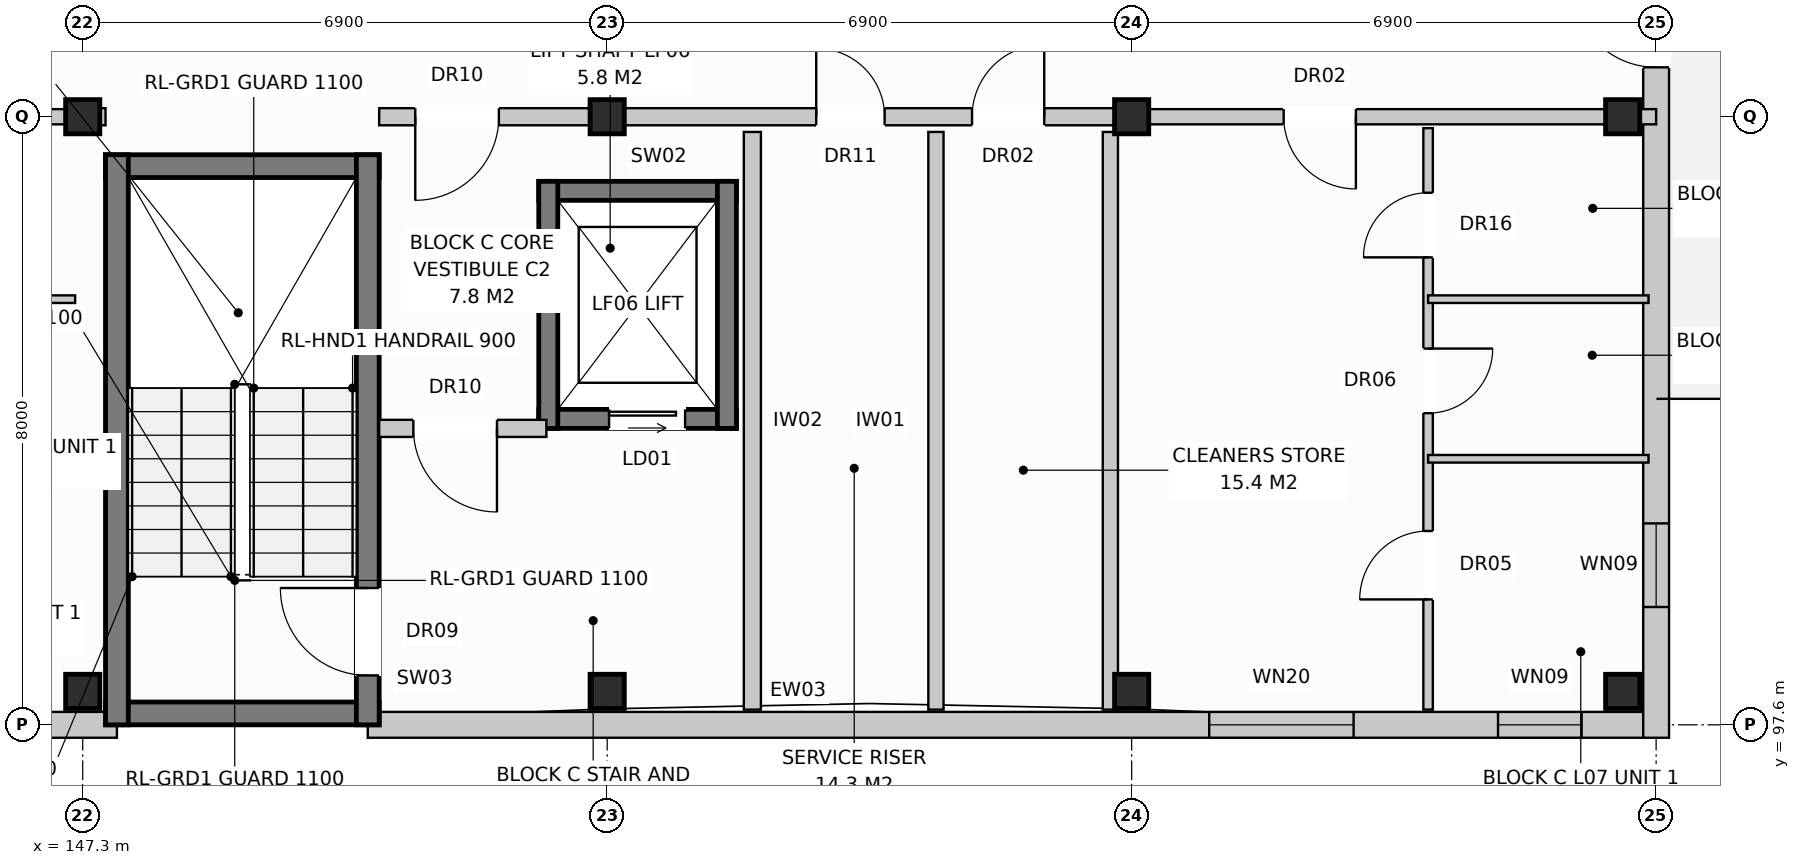
"""IFC4 building model, lengths in metres.
Left out: names, types, materials, properties, quantities, classifications, styles, units other than length and angle.
Written with IfcOpenShell. Run it as: python <this file> out.ifc"""

import sys

from ifc_helpers import new_model, si_unit, direction, frame, frame_2d, origin, origin_with_axes, origin_2d, place, context, subcontext, project, spatial, rectangle, extrude, element, fill, save


model = new_model("IFC4")
c1 = context("Model", 3, precision=1e-05, world=origin(), true_north=direction((0.0, 1.0)))
c2 = subcontext(c1, "Body", "Model", "MODEL_VIEW")
j1 = project(units=[si_unit("LENGTHUNIT", "METRE"), si_unit("PLANEANGLEUNIT", "RADIAN")], contexts=[c1])
p1 = place(None, origin())
s1 = spatial("IfcSite", under=j1, at=p1, CompositionType="ELEMENT")
p2 = place(p1, origin())
s2 = spatial("IfcBuilding", under=s1, at=p2, CompositionType="ELEMENT")
p3 = place(p2, frame((0.0, 0.0, 24.0)))
s3 = spatial("IfcBuildingStorey", under=s2, at=p3, CompositionType="ELEMENT", Elevation=24.0)
for number, where, z_axis, x_axis in (
    (1, (147.3, 98.04, 0.0), (0.0, 0.0, 1.0), (1.0, 0.0, 0.0)),
    (2, (147.3, 105.6, 0.0), (0.0, 0.0, 1.0), (1.0, 0.0, 0.0)),
    (3, (154.2, 98.04, 0.0), (0.0, 0.0, 1.0), (1.0, 0.0, 0.0)),
    (4, (154.2, 105.6, 0.0), (0.0, 0.0, 1.0), (1.0, 0.0, 0.0)),
    (5, (161.1, 98.04, 0.0), (0.0, 0.0, 1.0), (1.0, 0.0, 0.0)),
    (6, (161.1, 105.6, 0.0), (0.0, 0.0, 1.0), (1.0, 0.0, 0.0)),
    (7, (167.56, 98.04, 0.0), (0.0, 0.0, 1.0), (1.0, 0.0, 0.0)),
    (8, (167.56, 105.6, 0.0), (0.0, 0.0, 1.0), (1.0, 0.0, 0.0)),
):
    element("IfcColumn", number, at=place(p3, frame(where, z_axis=z_axis, x_axis=x_axis)), inside=s3, PredefinedType="COLUMN", context=c2, shape_type="SweptSolid", body=[
        extrude(rectangle(XDim=0.45, YDim=0.45, at=origin_2d()), origin(), (0.0, 0.0, 1.0), 3.2),
    ])
p4 = place(p3, frame((130.35, 97.6, 0.0), z_axis=(0.0, 0.0, 1.0), x_axis=(1.0, 0.0, 0.0)))
e9 = element("IfcWall", 9, at=p4, inside=s3, PredefinedType="STANDARD", context=c2, shape_type="SweptSolid", body=[
    extrude(rectangle(XDim=17.4, YDim=0.34, at=frame_2d((8.7, 0.0))), origin(), (0.0, 0.0, 1.0), 2.95),
])
p5 = place(p4, frame((11.87, 0.0, 0.0)))
e10 = element("IfcOpeningElement", 10, at=p5, cuts=e9, PredefinedType="OPENING", context=c2, shape_type="SweptSolid", body=[
    extrude(rectangle(XDim=0.95, YDim=2.1, at=frame_2d((0.475, 1.05))), frame((0.0, 0.182, 0.0), z_axis=(0.0, -1.0, 0.0), x_axis=(1.0, 0.0, 0.0)), (0.0, 0.0, 1.0), 0.364),
])
p6 = place(p4, frame((14.87, 0.0, 0.72)))
e11 = element("IfcOpeningElement", 11, at=p6, cuts=e9, PredefinedType="OPENING", context=c2, shape_type="SweptSolid", body=[
    extrude(rectangle(XDim=1.1, YDim=1.5, at=frame_2d((0.55, 0.75))), frame((0.0, 0.182, 0.0), z_axis=(0.0, -1.0, 0.0), x_axis=(1.0, 0.0, 0.0)), (0.0, 0.0, 1.0), 0.364),
])
p7 = place(p3, frame((151.05, 97.6, 0.0), z_axis=(0.0, 0.0, 1.0), x_axis=(1.0, 0.0, 0.0)))
e12 = element("IfcWall", 12, at=p7, inside=s3, PredefinedType="STANDARD", context=c2, shape_type="SweptSolid", body=[
    extrude(rectangle(XDim=16.79, YDim=0.34, at=frame_2d((8.395, 0.0))), origin(), (0.0, 0.0, 1.0), 2.95),
])
p8 = place(p7, frame((11.07, 0.0, 0.8)))
e13 = element("IfcOpeningElement", 13, at=p8, cuts=e12, PredefinedType="OPENING", context=c2, shape_type="SweptSolid", body=[
    extrude(rectangle(XDim=1.9, YDim=1.85, at=frame_2d((0.95, 0.925))), frame((0.0, 0.182, 0.0), z_axis=(0.0, -1.0, 0.0), x_axis=(1.0, 0.0, 0.0)), (0.0, 0.0, 1.0), 0.364),
])
p9 = place(p7, frame((14.87, 0.0, 0.72)))
e14 = element("IfcOpeningElement", 14, at=p9, cuts=e12, PredefinedType="OPENING", context=c2, shape_type="SweptSolid", body=[
    extrude(rectangle(XDim=1.1, YDim=1.5, at=frame_2d((0.55, 0.75))), frame((0.0, 0.182, 0.0), z_axis=(0.0, -1.0, 0.0), x_axis=(1.0, 0.0, 0.0)), (0.0, 0.0, 1.0), 0.364),
])
p10 = place(p3, frame((168.0, 97.43, 0.0), z_axis=(0.0, 0.0, 1.0), x_axis=(0.0, 1.0, 0.0)))
e15 = element("IfcWall", 15, at=p10, inside=s3, PredefinedType="STANDARD", context=c2, shape_type="SweptSolid", body=[
    extrude(rectangle(XDim=18.74, YDim=0.34, at=frame_2d((9.37, 0.0))), origin(), (0.0, 0.0, 1.0), 2.95),
])
p11 = place(p10, frame((8.82, 0.0, 0.0)))
e16 = element("IfcOpeningElement", 16, at=p11, cuts=e15, PredefinedType="OPENING", context=c2, shape_type="SweptSolid", body=[
    extrude(rectangle(XDim=1.1, YDim=2.1, at=frame_2d((0.55, 1.05))), frame((0.0, 0.182, 0.0), z_axis=(0.0, -1.0, 0.0), x_axis=(1.0, 0.0, 0.0)), (0.0, 0.0, 1.0), 0.364),
])
p12 = place(p10, frame((1.72, 0.0, 0.72)))
e17 = element("IfcOpeningElement", 17, at=p12, cuts=e15, PredefinedType="OPENING", context=c2, shape_type="SweptSolid", body=[
    extrude(rectangle(XDim=1.1, YDim=1.5, at=frame_2d((0.55, 0.75))), frame((0.0, 0.182, 0.0), z_axis=(0.0, -1.0, 0.0), x_axis=(1.0, 0.0, 0.0)), (0.0, 0.0, 1.0), 0.364),
])
p13 = place(p10, frame((15.92, 0.0, 0.72)))
e18 = element("IfcOpeningElement", 18, at=p13, cuts=e15, PredefinedType="OPENING", context=c2, shape_type="SweptSolid", body=[
    extrude(rectangle(XDim=1.1, YDim=1.5, at=frame_2d((0.55, 0.75))), frame((0.0, 0.182, 0.0), z_axis=(0.0, -1.0, 0.0), x_axis=(1.0, 0.0, 0.0)), (0.0, 0.0, 1.0), 0.364),
])
for number, where, z_axis, x_axis in (
    (19, (147.6, 97.75, 0.0), (0.0, 0.0, 1.0), (1.0, 0.0, 0.0)),
    (20, (147.6, 104.95, 0.0), (0.0, 0.0, 1.0), (1.0, 0.0, 0.0)),
):
    element("IfcWall", number, at=place(p3, frame(where, z_axis=z_axis, x_axis=x_axis)), inside=s3, PredefinedType="SHEAR", context=c2, shape_type="SweptSolid", body=[
        extrude(rectangle(XDim=3.6, YDim=0.3, at=frame_2d((1.8, 0.0))), origin(), (0.0, 0.0, 1.0), 2.95),
    ])
p14 = place(p3, frame((147.75, 97.6, 0.0), z_axis=(0.0, 0.0, 1.0), x_axis=(0.0, 1.0, 0.0)))
e21 = element("IfcWall", 21, at=p14, inside=s3, PredefinedType="SHEAR", context=c2, shape_type="SweptSolid", body=[
    extrude(rectangle(XDim=7.5, YDim=0.3, at=frame_2d((3.75, 0.0))), origin(), (0.0, 0.0, 1.0), 2.95),
])
p15 = place(p3, frame((151.05, 97.6, 0.0), z_axis=(0.0, 0.0, 1.0), x_axis=(0.0, 1.0, 0.0)))
e22 = element("IfcWall", 22, at=p15, inside=s3, PredefinedType="SHEAR", context=c2, shape_type="SweptSolid", body=[
    extrude(rectangle(XDim=7.5, YDim=0.3, at=frame_2d((3.75, 0.0))), origin(), (0.0, 0.0, 1.0), 2.95),
])
p16 = place(p15, frame((0.65, 0.0, 0.0)))
e23 = element("IfcOpeningElement", 23, at=p16, cuts=e22, PredefinedType="OPENING", context=c2, shape_type="SweptSolid", body=[
    extrude(rectangle(XDim=1.15, YDim=2.15, at=frame_2d((0.575, 1.075))), frame((0.0, 0.162, 0.0), z_axis=(0.0, -1.0, 0.0), x_axis=(1.0, 0.0, 0.0)), (0.0, 0.0, 1.0), 0.324),
])
p17 = place(p3, frame((153.3, 101.625, 0.0), z_axis=(0.0, 0.0, 1.0), x_axis=(1.0, 0.0, 0.0)))
e24 = element("IfcWall", 24, at=p17, inside=s3, PredefinedType="SHEAR", context=c2, shape_type="SweptSolid", body=[
    extrude(rectangle(XDim=2.6, YDim=0.25, at=frame_2d((1.3, 0.0))), origin(), (0.0, 0.0, 1.0), 2.95),
])
p18 = place(p17, frame((0.925, 0.0, 0.0)))
e25 = element("IfcOpeningElement", 25, at=p18, cuts=e24, PredefinedType="OPENING", context=c2, shape_type="SweptSolid", body=[
    extrude(rectangle(XDim=1.0, YDim=2.1, at=frame_2d((0.5, 1.05))), frame((0.0, 0.137, 0.0), z_axis=(0.0, -1.0, 0.0), x_axis=(1.0, 0.0, 0.0)), (0.0, 0.0, 1.0), 0.274),
])
p19 = place(p3, frame((153.3, 104.625, 0.0), z_axis=(0.0, 0.0, 1.0), x_axis=(1.0, 0.0, 0.0)))
e26 = element("IfcWall", 26, at=p19, inside=s3, PredefinedType="SHEAR", context=c2, shape_type="SweptSolid", body=[
    extrude(rectangle(XDim=2.6, YDim=0.25, at=frame_2d((1.3, 0.0))), origin(), (0.0, 0.0, 1.0), 2.95),
])
for number, where, z_axis, x_axis in (
    (27, (153.425, 101.5, 0.0), (0.0, 0.0, 1.0), (0.0, 1.0, 0.0)),
    (28, (155.775, 101.5, 0.0), (0.0, 0.0, 1.0), (0.0, 1.0, 0.0)),
):
    element("IfcWall", number, at=place(p3, frame(where, z_axis=z_axis, x_axis=x_axis)), inside=s3, PredefinedType="SHEAR", context=c2, shape_type="SweptSolid", body=[
        extrude(rectangle(XDim=3.25, YDim=0.25, at=frame_2d((1.625, 0.0))), origin(), (0.0, 0.0, 1.0), 2.95),
    ])
p20 = place(p3, frame((156.11, 97.8, 0.0), z_axis=(0.0, 0.0, 1.0), x_axis=(0.0, 1.0, 0.0)))
e29 = element("IfcWall", 29, at=p20, inside=s3, PredefinedType="PARTITIONING", context=c2, shape_type="SweptSolid", body=[
    extrude(rectangle(XDim=7.6, YDim=0.225, at=frame_2d((3.8, 0.0))), origin(), (0.0, 0.0, 1.0), 2.95),
])
p21 = place(p3, frame((151.2, 101.5, 0.0), z_axis=(0.0, 0.0, 1.0), x_axis=(1.0, 0.0, 0.0)))
e30 = element("IfcWall", 30, at=p21, inside=s3, PredefinedType="PARTITIONING", context=c2, shape_type="SweptSolid", body=[
    extrude(rectangle(XDim=2.2, YDim=0.225, at=frame_2d((1.1, 0.0))), origin(), (0.0, 0.0, 1.0), 2.95),
])
p22 = place(p21, frame((0.45, 0.0, 0.0)))
e31 = element("IfcOpeningElement", 31, at=p22, cuts=e30, PredefinedType="OPENING", context=c2, shape_type="SweptSolid", body=[
    extrude(rectangle(XDim=1.1, YDim=2.15, at=frame_2d((0.55, 1.075))), frame((0.0, 0.125, 0.0), z_axis=(0.0, -1.0, 0.0), x_axis=(1.0, 0.0, 0.0)), (0.0, 0.0, 1.0), 0.249),
])
p23 = place(p3, frame((147.3, 105.6, 0.0), z_axis=(0.0, 0.0, 1.0), x_axis=(1.0, 0.0, 0.0)))
e32 = element("IfcWall", 32, at=p23, inside=s3, PredefinedType="PARTITIONING", context=c2, shape_type="SweptSolid", body=[
    extrude(rectangle(XDim=0.3, YDim=0.225, at=frame_2d((0.15, 0.0))), origin(), (0.0, 0.0, 1.0), 2.95),
])
p24 = place(p3, frame((158.525, 97.8, 0.0), z_axis=(0.0, 0.0, 1.0), x_axis=(0.0, 1.0, 0.0)))
e33 = element("IfcWall", 33, at=p24, inside=s3, PredefinedType="PARTITIONING", context=c2, shape_type="SweptSolid", body=[
    extrude(rectangle(XDim=7.6, YDim=0.2, at=frame_2d((3.8, 0.0))), origin(), (0.0, 0.0, 1.0), 2.95),
])
p25 = place(p3, frame((160.82, 97.8, 0.0), z_axis=(0.0, 0.0, 1.0), x_axis=(0.0, 1.0, 0.0)))
e34 = element("IfcWall", 34, at=p25, inside=s3, PredefinedType="PARTITIONING", context=c2, shape_type="SweptSolid", body=[
    extrude(rectangle(XDim=7.6, YDim=0.2, at=frame_2d((3.8, 0.0))), origin(), (0.0, 0.0, 1.0), 2.39),
])
p26 = place(p3, frame((151.2, 105.6, 0.0), z_axis=(0.0, 0.0, 1.0), x_axis=(1.0, 0.0, 0.0)))
e35 = element("IfcWall", 35, at=p26, inside=s3, PredefinedType="PARTITIONING", context=c2, shape_type="SweptSolid", body=[
    extrude(rectangle(XDim=9.9, YDim=0.225, at=frame_2d((4.95, 0.0))), origin(), (0.0, 0.0, 1.0), 2.39),
])
p27 = place(p26, frame((0.475, 0.0, 0.0)))
e36 = element("IfcOpeningElement", 36, at=p27, cuts=e35, PredefinedType="OPENING", context=c2, shape_type="SweptSolid", body=[
    extrude(rectangle(XDim=1.1, YDim=2.15, at=frame_2d((0.55, 1.075))), frame((0.0, 0.125, 0.0), z_axis=(0.0, -1.0, 0.0), x_axis=(1.0, 0.0, 0.0)), (0.0, 0.0, 1.0), 0.249),
])
p28 = place(p26, frame((5.75, 0.0, 0.0)))
e37 = element("IfcOpeningElement", 37, at=p28, cuts=e35, PredefinedType="OPENING", context=c2, shape_type="SweptSolid", body=[
    extrude(rectangle(XDim=0.9, YDim=2.1, at=frame_2d((0.45, 1.05))), frame((0.0, 0.125, 0.0), z_axis=(0.0, -1.0, 0.0), x_axis=(1.0, 0.0, 0.0)), (0.0, 0.0, 1.0), 0.249),
])
p29 = place(p26, frame((7.8, 0.0, 0.0)))
e38 = element("IfcOpeningElement", 38, at=p29, cuts=e35, PredefinedType="OPENING", context=c2, shape_type="SweptSolid", body=[
    extrude(rectangle(XDim=0.95, YDim=2.15, at=frame_2d((0.475, 1.075))), frame((0.0, 0.125, 0.0), z_axis=(0.0, -1.0, 0.0), x_axis=(1.0, 0.0, 0.0)), (0.0, 0.0, 1.0), 0.249),
])
p30 = place(p3, frame((140.4, 105.6, 0.0), z_axis=(0.0, 0.0, 1.0), x_axis=(1.0, 0.0, 0.0)))
e39 = element("IfcWall", 39, at=p30, inside=s3, PredefinedType="PARTITIONING", context=c2, shape_type="SweptSolid", body=[
    extrude(rectangle(XDim=6.9, YDim=0.2, at=frame_2d((3.45, 0.0))), origin(), (0.0, 0.0, 1.0), 2.39),
])
p31 = place(p30, frame((2.0, 0.0, 0.0)))
e40 = element("IfcOpeningElement", 40, at=p31, cuts=e39, PredefinedType="OPENING", context=c2, shape_type="SweptSolid", body=[
    extrude(rectangle(XDim=0.95, YDim=2.15, at=frame_2d((0.475, 1.075))), frame((0.0, 0.112, 0.0), z_axis=(0.0, -1.0, 0.0), x_axis=(1.0, 0.0, 0.0)), (0.0, 0.0, 1.0), 0.224),
])
for number, where, z_axis, x_axis in (
    (41, (144.3, 103.2, 0.0), (0.0, 0.0, 1.0), (1.0, 0.0, 0.0)),
    (42, (144.3, 101.1, 0.0), (0.0, 0.0, 1.0), (1.0, 0.0, 0.0)),
):
    element("IfcWall", number, at=place(p3, frame(where, z_axis=z_axis, x_axis=x_axis)), inside=s3, PredefinedType="PARTITIONING", context=c2, shape_type="SweptSolid", body=[
        extrude(rectangle(XDim=2.9, YDim=0.1, at=frame_2d((1.45, 0.0))), origin(), (0.0, 0.0, 1.0), 2.95),
    ])
p32 = place(p3, frame((161.1, 105.6, 0.0), z_axis=(0.0, 0.0, 1.0), x_axis=(1.0, 0.0, 0.0)))
e43 = element("IfcWall", 43, at=p32, inside=s3, PredefinedType="PARTITIONING", context=c2, shape_type="SweptSolid", body=[
    extrude(rectangle(XDim=6.9, YDim=0.2, at=frame_2d((3.45, 0.0))), origin(), (0.0, 0.0, 1.0), 2.39),
])
p33 = place(p32, frame((2.0, 0.0, 0.0)))
e44 = element("IfcOpeningElement", 44, at=p33, cuts=e43, PredefinedType="OPENING", context=c2, shape_type="SweptSolid", body=[
    extrude(rectangle(XDim=0.95, YDim=2.15, at=frame_2d((0.475, 1.075))), frame((0.0, 0.112, 0.0), z_axis=(0.0, -1.0, 0.0), x_axis=(1.0, 0.0, 0.0)), (0.0, 0.0, 1.0), 0.224),
])
p34 = place(p3, frame((165.0, 105.45, 0.0), z_axis=(0.0, 0.0, 1.0), x_axis=(0.0, -1.0, 0.0)))
e45 = element("IfcWall", 45, at=p34, inside=s3, PredefinedType="PARTITIONING", context=c2, shape_type="SweptSolid", body=[
    extrude(rectangle(XDim=7.65, YDim=0.125, at=frame_2d((3.825, 0.0))), origin(), (0.0, 0.0, 1.0), 2.95),
])
p35 = place(p34, frame((0.85, 0.0, 0.0)))
e46 = element("IfcOpeningElement", 46, at=p35, cuts=e45, PredefinedType="OPENING", context=c2, shape_type="SweptSolid", body=[
    extrude(rectangle(XDim=0.85, YDim=2.1, at=frame_2d((0.425, 1.05))), frame((0.0, 0.074, 0.0), z_axis=(0.0, -1.0, 0.0), x_axis=(1.0, 0.0, 0.0)), (0.0, 0.0, 1.0), 0.149),
])
p36 = place(p34, frame((2.9, 0.0, 0.0)))
e47 = element("IfcOpeningElement", 47, at=p36, cuts=e45, PredefinedType="OPENING", context=c2, shape_type="SweptSolid", body=[
    extrude(rectangle(XDim=0.85, YDim=2.05, at=frame_2d((0.425, 1.025))), frame((0.0, 0.074, 0.0), z_axis=(0.0, -1.0, 0.0), x_axis=(1.0, 0.0, 0.0)), (0.0, 0.0, 1.0), 0.149),
])
p37 = place(p34, frame((5.3, 0.0, 0.0)))
e48 = element("IfcOpeningElement", 48, at=p37, cuts=e45, PredefinedType="OPENING", context=c2, shape_type="SweptSolid", body=[
    extrude(rectangle(XDim=0.9, YDim=2.1, at=frame_2d((0.45, 1.05))), frame((0.0, 0.074, 0.0), z_axis=(0.0, -1.0, 0.0), x_axis=(1.0, 0.0, 0.0)), (0.0, 0.0, 1.0), 0.149),
])
for number, where, z_axis, x_axis in (
    (49, (165.0, 103.2, 0.0), (0.0, 0.0, 1.0), (1.0, 0.0, 0.0)),
    (50, (165.0, 101.1, 0.0), (0.0, 0.0, 1.0), (1.0, 0.0, 0.0)),
):
    element("IfcWall", number, at=place(p3, frame(where, z_axis=z_axis, x_axis=x_axis)), inside=s3, PredefinedType="PARTITIONING", context=c2, shape_type="SweptSolid", body=[
        extrude(rectangle(XDim=2.9, YDim=0.1, at=frame_2d((1.45, 0.0))), origin(), (0.0, 0.0, 1.0), 2.95),
    ])
p38 = place(p8, origin_with_axes())
e51 = element("IfcWindow", 51, at=p38, inside=s3, PartitioningType="SINGLE_PANEL", PredefinedType="WINDOW", context=c2, shape_type="SweptSolid", body=[
    extrude(rectangle(XDim=1.9, YDim=1.85, at=frame_2d((0.95, 0.925))), frame((0.0, 0.03, 0.0), z_axis=(0.0, -1.0, 0.0), x_axis=(1.0, 0.0, 0.0)), (0.0, 0.0, 1.0), 0.06),
])
fill(e13, e51)
p39 = place(p9, origin_with_axes())
e52 = element("IfcWindow", 52, at=p39, inside=s3, PartitioningType="SINGLE_PANEL", PredefinedType="WINDOW", context=c2, shape_type="SweptSolid", body=[
    extrude(rectangle(XDim=1.1, YDim=1.5, at=frame_2d((0.55, 0.75))), frame((0.0, 0.03, 0.0), z_axis=(0.0, -1.0, 0.0), x_axis=(1.0, 0.0, 0.0)), (0.0, 0.0, 1.0), 0.06),
])
fill(e14, e52)
p40 = place(p11, origin_with_axes())
e53 = element("IfcDoor", 53, at=p40, inside=s3, OperationType="SINGLE_SWING_RIGHT", PredefinedType="DOOR", context=c2, shape_type="SweptSolid", body=[
    extrude(rectangle(XDim=1.1, YDim=2.1, at=frame_2d((0.55, 1.05))), frame((0.0, 0.025, 0.0), z_axis=(0.0, -1.0, 0.0), x_axis=(1.0, 0.0, 0.0)), (0.0, 0.0, 1.0), 0.05),
])
fill(e16, e53)
p41 = place(p12, origin_with_axes())
e54 = element("IfcWindow", 54, at=p41, inside=s3, PartitioningType="SINGLE_PANEL", PredefinedType="WINDOW", context=c2, shape_type="SweptSolid", body=[
    extrude(rectangle(XDim=1.1, YDim=1.5, at=frame_2d((0.55, 0.75))), frame((0.0, 0.03, 0.0), z_axis=(0.0, -1.0, 0.0), x_axis=(1.0, 0.0, 0.0)), (0.0, 0.0, 1.0), 0.06),
])
fill(e17, e54)
p42 = place(p16, origin_with_axes())
e55 = element("IfcDoor", 55, at=p42, inside=s3, OperationType="SINGLE_SWING_RIGHT", PredefinedType="DOOR", context=c2, shape_type="SweptSolid", body=[
    extrude(rectangle(XDim=1.15, YDim=2.15, at=frame_2d((0.575, 1.075))), frame((0.0, 0.025, 0.0), z_axis=(0.0, -1.0, 0.0), x_axis=(1.0, 0.0, 0.0)), (0.0, 0.0, 1.0), 0.05),
])
fill(e23, e55)
p43 = place(p18, origin_with_axes())
e56 = element("IfcDoor", 56, at=p43, inside=s3, OperationType="SLIDING_TO_LEFT", PredefinedType="DOOR", context=c2, shape_type="SweptSolid", body=[
    extrude(rectangle(XDim=1.0, YDim=2.1, at=frame_2d((0.5, 1.05))), frame((0.0, 0.025, 0.0), z_axis=(0.0, -1.0, 0.0), x_axis=(1.0, 0.0, 0.0)), (0.0, 0.0, 1.0), 0.05),
])
fill(e25, e56)
p44 = place(p22, frame((1.1, 0.0, 0.0), z_axis=(0.0, 0.0, 1.0), x_axis=(-1.0, 0.0, 0.0)))
e57 = element("IfcDoor", 57, at=p44, inside=s3, OperationType="SINGLE_SWING_RIGHT", PredefinedType="DOOR", context=c2, shape_type="SweptSolid", body=[
    extrude(rectangle(XDim=1.1, YDim=2.15, at=frame_2d((0.55, 1.075))), frame((0.0, 0.025, 0.0), z_axis=(0.0, -1.0, 0.0), x_axis=(1.0, 0.0, 0.0)), (0.0, 0.0, 1.0), 0.05),
])
fill(e31, e57)
p45 = place(p27, frame((1.1, 0.0, 0.0), z_axis=(0.0, 0.0, 1.0), x_axis=(-1.0, 0.0, 0.0)))
e58 = element("IfcDoor", 58, at=p45, inside=s3, OperationType="SINGLE_SWING_LEFT", PredefinedType="DOOR", context=c2, shape_type="SweptSolid", body=[
    extrude(rectangle(XDim=1.1, YDim=2.15, at=frame_2d((0.55, 1.075))), frame((0.0, 0.025, 0.0), z_axis=(0.0, -1.0, 0.0), x_axis=(1.0, 0.0, 0.0)), (0.0, 0.0, 1.0), 0.05),
])
fill(e36, e58)
p46 = place(p28, origin_with_axes())
e59 = element("IfcDoor", 59, at=p46, inside=s3, OperationType="SINGLE_SWING_LEFT", PredefinedType="DOOR", context=c2, shape_type="SweptSolid", body=[
    extrude(rectangle(XDim=0.9, YDim=2.1, at=frame_2d((0.45, 1.05))), frame((0.0, 0.025, 0.0), z_axis=(0.0, -1.0, 0.0), x_axis=(1.0, 0.0, 0.0)), (0.0, 0.0, 1.0), 0.05),
])
fill(e37, e59)
p47 = place(p29, origin_with_axes())
e60 = element("IfcDoor", 60, at=p47, inside=s3, OperationType="SINGLE_SWING_RIGHT", PredefinedType="DOOR", context=c2, shape_type="SweptSolid", body=[
    extrude(rectangle(XDim=0.95, YDim=2.15, at=frame_2d((0.475, 1.075))), frame((0.0, 0.025, 0.0), z_axis=(0.0, -1.0, 0.0), x_axis=(1.0, 0.0, 0.0)), (0.0, 0.0, 1.0), 0.05),
])
fill(e38, e60)
p48 = place(p33, frame((0.95, 0.0, 0.0), z_axis=(0.0, 0.0, 1.0), x_axis=(-1.0, 0.0, 0.0)))
e61 = element("IfcDoor", 61, at=p48, inside=s3, OperationType="SINGLE_SWING_RIGHT", PredefinedType="DOOR", context=c2, shape_type="SweptSolid", body=[
    extrude(rectangle(XDim=0.95, YDim=2.15, at=frame_2d((0.475, 1.075))), frame((0.0, 0.025, 0.0), z_axis=(0.0, -1.0, 0.0), x_axis=(1.0, 0.0, 0.0)), (0.0, 0.0, 1.0), 0.05),
])
fill(e44, e61)
p49 = place(p35, frame((0.85, 0.0, 0.0), z_axis=(0.0, 0.0, 1.0), x_axis=(-1.0, 0.0, 0.0)))
e62 = element("IfcDoor", 62, at=p49, inside=s3, OperationType="SINGLE_SWING_RIGHT", PredefinedType="DOOR", context=c2, shape_type="SweptSolid", body=[
    extrude(rectangle(XDim=0.85, YDim=2.1, at=frame_2d((0.425, 1.05))), frame((0.0, 0.025, 0.0), z_axis=(0.0, -1.0, 0.0), x_axis=(1.0, 0.0, 0.0)), (0.0, 0.0, 1.0), 0.05),
])
fill(e46, e62)
p50 = place(p36, origin_with_axes())
e63 = element("IfcDoor", 63, at=p50, inside=s3, OperationType="SINGLE_SWING_LEFT", PredefinedType="DOOR", context=c2, shape_type="SweptSolid", body=[
    extrude(rectangle(XDim=0.85, YDim=2.05, at=frame_2d((0.425, 1.025))), frame((0.0, 0.025, 0.0), z_axis=(0.0, -1.0, 0.0), x_axis=(1.0, 0.0, 0.0)), (0.0, 0.0, 1.0), 0.05),
])
fill(e47, e63)
p51 = place(p37, frame((0.9, 0.0, 0.0), z_axis=(0.0, 0.0, 1.0), x_axis=(-1.0, 0.0, 0.0)))
e64 = element("IfcDoor", 64, at=p51, inside=s3, OperationType="SINGLE_SWING_RIGHT", PredefinedType="DOOR", context=c2, shape_type="SweptSolid", body=[
    extrude(rectangle(XDim=0.9, YDim=2.1, at=frame_2d((0.45, 1.05))), frame((0.0, 0.025, 0.0), z_axis=(0.0, -1.0, 0.0), x_axis=(1.0, 0.0, 0.0)), (0.0, 0.0, 1.0), 0.05),
])
fill(e48, e64)
save(model, sys.argv[1])
